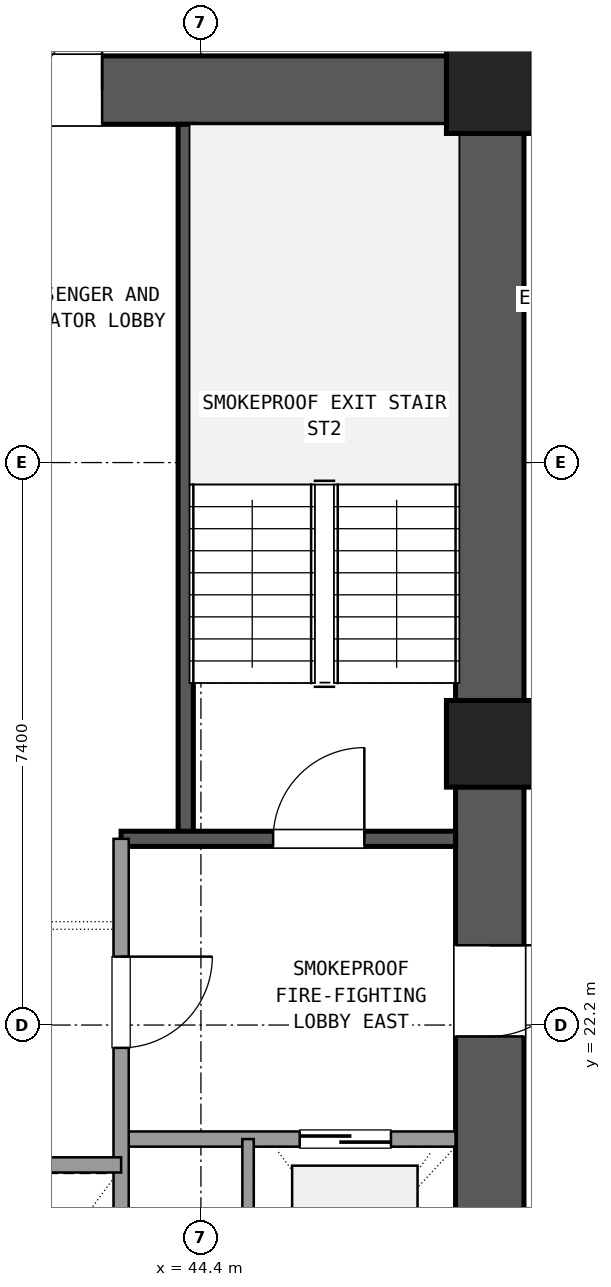
"""IFC4 building model, lengths in metres.
Left out: names, types, materials, properties, quantities, classifications, styles, units other than length and angle.
Written with IfcOpenShell. Run it as: python <this file> out.ifc"""

import sys

from ifc_helpers import new_model, si_unit, direction, frame, frame_2d, origin, origin_2d, place, context, subcontext, project, spatial, rectangle, extrude, element, fill, save


model = new_model("IFC4")
c1 = context("Model", 3, precision=1e-05, world=origin(), true_north=direction((0.0, 1.0)))
c2 = subcontext(c1, "Body", "Model", "MODEL_VIEW")
j1 = project(units=[si_unit("LENGTHUNIT", "METRE"), si_unit("PLANEANGLEUNIT", "RADIAN")], contexts=[c1])
p1 = place(None, origin())
s1 = spatial("IfcSite", under=j1, at=p1, CompositionType="ELEMENT")
p2 = place(p1, origin())
s2 = spatial("IfcBuilding", under=s1, at=p2, CompositionType="ELEMENT")
p3 = place(p2, frame((0.0, 0.0, 34.74)))
s3 = spatial("IfcBuildingStorey", under=s2, at=p3, CompositionType="ELEMENT", Elevation=34.74)
for number, where, z_axis, x_axis in (
    (1, (48.2, 25.9, 0.0), (0.0, 0.0, 1.0), (1.0, 0.0, 0.0)),
    (2, (48.2, 34.5, 0.0), (0.0, 0.0, 1.0), (1.0, 0.0, 0.0)),
):
    element("IfcColumn", number, at=place(p3, frame(where, z_axis=z_axis, x_axis=x_axis)), inside=s3, PredefinedType="COLUMN", context=c2, shape_type="SweptSolid", body=[
        extrude(rectangle(XDim=1.14, YDim=1.14, at=origin_2d()), origin(), (0.0, 0.0, 1.0), 3.6),
    ])
p4 = place(p3, frame((48.2, 17.865, 0.0), z_axis=(0.0, 0.0, 1.0), x_axis=(0.0, 1.0, 0.0)))
e3 = element("IfcWall", 3, at=p4, inside=s3, PredefinedType="SHEAR", context=c2, shape_type="SweptSolid", body=[
    extrude(rectangle(XDim=7.47, YDim=0.9, at=frame_2d((3.735, 0.0))), origin(), (0.0, 0.0, 1.0), 3.32),
])
p5 = place(p4, frame((4.185, 0.0, 0.0)))
e4 = element("IfcOpeningElement", 4, at=p5, cuts=e3, PredefinedType="OPENING", context=c2, shape_type="SweptSolid", body=[
    extrude(rectangle(XDim=1.2, YDim=2.15, at=frame_2d((0.6, 1.075))), frame((0.0, 0.46, 0.0), z_axis=(0.0, -1.0, 0.0), x_axis=(1.0, 0.0, 0.0)), (0.0, 0.0, 1.0), 0.92),
])
p6 = place(p3, frame((48.2, 26.465, 0.0), z_axis=(0.0, 0.0, 1.0), x_axis=(0.0, 1.0, 0.0)))
e5 = element("IfcWall", 5, at=p6, inside=s3, PredefinedType="SHEAR", context=c2, shape_type="SweptSolid", body=[
    extrude(rectangle(XDim=7.47, YDim=0.9, at=frame_2d((3.735, 0.0))), origin(), (0.0, 0.0, 1.0), 3.32),
])
p7 = place(p3, frame((47.635, 34.5, 0.0), z_axis=(0.0, 0.0, 1.0), x_axis=(-1.0, 0.0, 0.0)))
e6 = element("IfcWall", 6, at=p7, inside=s3, PredefinedType="SHEAR", context=c2, shape_type="SweptSolid", body=[
    extrude(rectangle(XDim=10.07, YDim=0.9, at=frame_2d((5.035, 0.0))), origin(), (0.0, 0.0, 1.0), 3.32),
])
p8 = place(p7, frame((4.535, 0.0, 0.0)))
e7 = element("IfcOpeningElement", 7, at=p8, cuts=e6, PredefinedType="OPENING", context=c2, shape_type="SweptSolid", body=[
    extrude(rectangle(XDim=1.6, YDim=2.2, at=frame_2d((0.8, 1.1))), frame((0.0, 0.46, 0.0), z_axis=(0.0, -1.0, 0.0), x_axis=(1.0, 0.0, 0.0)), (0.0, 0.0, 1.0), 0.92),
])
p9 = place(p3, frame((44.2, 24.65, 0.0), z_axis=(0.0, 0.0, 1.0), x_axis=(0.0, 1.0, 0.0)))
e8 = element("IfcWall", 8, at=p9, inside=s3, PredefinedType="SHEAR", context=c2, shape_type="SweptSolid", body=[
    extrude(rectangle(XDim=9.4, YDim=0.2, at=frame_2d((4.7, 0.0))), origin(), (0.0, 0.0, 1.0), 3.32),
])
p10 = place(p3, frame((43.35, 24.65, 0.0), z_axis=(0.0, 0.0, 1.0), x_axis=(1.0, 0.0, 0.0)))
e9 = element("IfcWall", 9, at=p10, inside=s3, PredefinedType="SHEAR", context=c2, shape_type="SweptSolid", body=[
    extrude(rectangle(XDim=4.4, YDim=0.2, at=frame_2d((2.2, 0.0))), origin(), (0.0, 0.0, 1.0), 3.32),
])
p11 = place(p10, frame((2.0, 0.0, 0.0)))
e10 = element("IfcOpeningElement", 10, at=p11, cuts=e9, PredefinedType="OPENING", context=c2, shape_type="SweptSolid", body=[
    extrude(rectangle(XDim=1.2, YDim=2.15, at=frame_2d((0.6, 1.075))), frame((0.0, 0.11, 0.0), z_axis=(0.0, -1.0, 0.0), x_axis=(1.0, 0.0, 0.0)), (0.0, 0.0, 1.0), 0.22),
])
p12 = place(p3, frame((43.35, 20.7, 0.0), z_axis=(0.0, 0.0, 1.0), x_axis=(1.0, 0.0, 0.0)))
e11 = element("IfcWall", 11, at=p12, inside=s3, PredefinedType="SOLIDWALL", context=c2, shape_type="SweptSolid", body=[
    extrude(rectangle(XDim=4.4, YDim=0.2, at=frame_2d((2.2, 0.0))), origin(), (0.0, 0.0, 1.0), 2.61),
])
p13 = place(p12, frame((2.35, 0.0, 0.0)))
e12 = element("IfcOpeningElement", 12, at=p13, cuts=e11, PredefinedType="OPENING", context=c2, shape_type="SweptSolid", body=[
    extrude(rectangle(XDim=1.2, YDim=2.15, at=frame_2d((0.6, 1.075))), frame((0.0, 0.11, 0.0), z_axis=(0.0, -1.0, 0.0), x_axis=(1.0, 0.0, 0.0)), (0.0, 0.0, 1.0), 0.22),
])
p14 = place(p3, frame((43.35, 17.75, 0.0), z_axis=(0.0, 0.0, 1.0), x_axis=(0.0, 1.0, 0.0)))
e13 = element("IfcWall", 13, at=p14, inside=s3, PredefinedType="SOLIDWALL", context=c2, shape_type="SweptSolid", body=[
    extrude(rectangle(XDim=6.9, YDim=0.2, at=frame_2d((3.45, 0.0))), origin(), (0.0, 0.0, 1.0), 2.61),
])
p15 = place(p14, frame((4.15, 0.0, 0.0)))
e14 = element("IfcOpeningElement", 14, at=p15, cuts=e13, PredefinedType="OPENING", context=c2, shape_type="SweptSolid", body=[
    extrude(rectangle(XDim=1.2, YDim=2.15, at=frame_2d((0.6, 1.075))), frame((0.0, 0.11, 0.0), z_axis=(0.0, -1.0, 0.0), x_axis=(1.0, 0.0, 0.0)), (0.0, 0.0, 1.0), 0.22),
])
p16 = place(p3, frame((45.02, 17.75, 0.0), z_axis=(0.0, 0.0, 1.0), x_axis=(0.0, 1.0, 0.0)))
e15 = element("IfcWall", 15, at=p16, inside=s3, PredefinedType="PARTITIONING", context=c2, shape_type="SweptSolid", body=[
    extrude(rectangle(XDim=2.95, YDim=0.15, at=frame_2d((1.475, 0.0))), origin(), (0.0, 0.0, 1.0), 2.61),
])
p17 = place(p3, frame((37.25, 20.36, 0.0), z_axis=(0.0, 0.0, 1.0), x_axis=(1.0, 0.0, 0.0)))
e16 = element("IfcWall", 16, at=p17, inside=s3, PredefinedType="SOLIDWALL", context=c2, shape_type="SweptSolid", body=[
    extrude(rectangle(XDim=6.1, YDim=0.2, at=frame_2d((3.05, 0.0))), origin(), (0.0, 0.0, 1.0), 2.61),
])
p18 = place(p11, origin())
e17 = element("IfcDoor", 17, at=p18, inside=s3, OperationType="SINGLE_SWING_RIGHT", PredefinedType="DOOR", context=c2, shape_type="SweptSolid", body=[
    extrude(rectangle(XDim=1.2, YDim=2.15, at=frame_2d((0.6, 1.075))), frame((0.0, 0.025, 0.0), z_axis=(0.0, -1.0, 0.0), x_axis=(1.0, 0.0, 0.0)), (0.0, 0.0, 1.0), 0.05),
])
fill(e10, e17)
p19 = place(p13, origin())
e18 = element("IfcDoor", 18, at=p19, inside=s3, OperationType="SLIDING_TO_RIGHT", PredefinedType="DOOR", context=c2, shape_type="SweptSolid", body=[
    extrude(rectangle(XDim=1.2, YDim=2.15, at=frame_2d((0.6, 1.075))), frame((0.0, 0.025, 0.0), z_axis=(0.0, -1.0, 0.0), x_axis=(1.0, 0.0, 0.0)), (0.0, 0.0, 1.0), 0.05),
])
fill(e12, e18)
p20 = place(p15, frame((1.2, 0.0, 0.0), z_axis=(0.0, 0.0, 1.0), x_axis=(-1.0, 0.0, 0.0)))
e19 = element("IfcDoor", 19, at=p20, inside=s3, OperationType="SINGLE_SWING_RIGHT", PredefinedType="DOOR", context=c2, shape_type="SweptSolid", body=[
    extrude(rectangle(XDim=1.2, YDim=2.15, at=frame_2d((0.6, 1.075))), frame((0.0, 0.025, 0.0), z_axis=(0.0, -1.0, 0.0), x_axis=(1.0, 0.0, 0.0)), (0.0, 0.0, 1.0), 0.05),
])
fill(e14, e19)
p21 = place(p5, frame((1.2, 0.0, 0.0), z_axis=(0.0, 0.0, 1.0), x_axis=(-1.0, 0.0, 0.0)))
e20 = element("IfcDoor", 20, at=p21, inside=s3, OperationType="SINGLE_SWING_RIGHT", PredefinedType="DOOR", context=c2, shape_type="SweptSolid", body=[
    extrude(rectangle(XDim=1.2, YDim=2.15, at=frame_2d((0.6, 1.075))), frame((0.0, 0.025, 0.0), z_axis=(0.0, -1.0, 0.0), x_axis=(1.0, 0.0, 0.0)), (0.0, 0.0, 1.0), 0.05),
])
fill(e4, e20)
p22 = place(p8, frame((1.6, 0.0, 0.0), z_axis=(0.0, 0.0, 1.0), x_axis=(-1.0, 0.0, 0.0)))
e21 = element("IfcDoor", 21, at=p22, inside=s3, OperationType="DOUBLE_DOOR_SINGLE_SWING", PredefinedType="DOOR", context=c2, shape_type="SweptSolid", body=[
    extrude(rectangle(XDim=1.6, YDim=2.2, at=frame_2d((0.8, 1.1))), frame((0.0, 0.025, 0.0), z_axis=(0.0, -1.0, 0.0), x_axis=(1.0, 0.0, 0.0)), (0.0, 0.0, 1.0), 0.05),
])
fill(e7, e21)
save(model, sys.argv[1])
